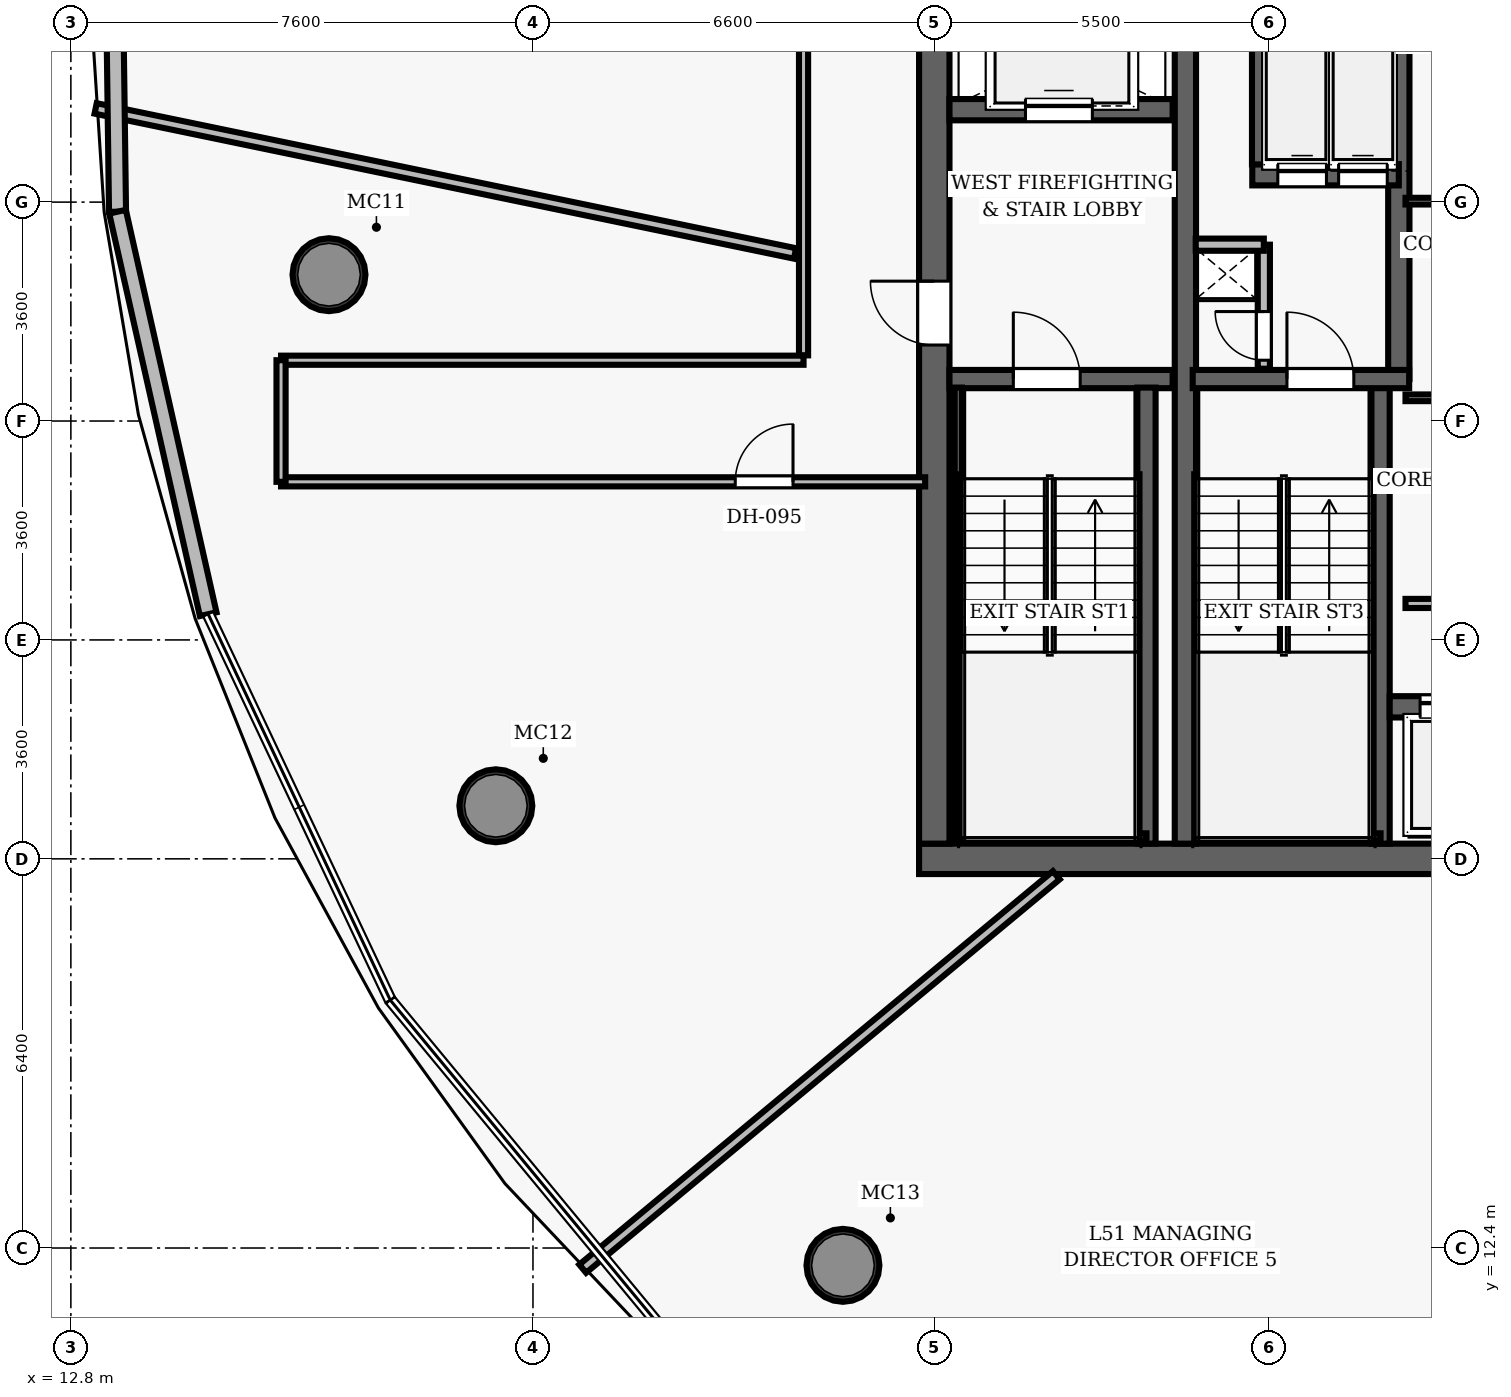
"""IFC4 building model, lengths in metres.
Left out: names, types, materials, properties, quantities, classifications, styles, units other than length and angle.
Written with IfcOpenShell. Run it as: python <this file> out.ifc"""

import sys

from ifc_helpers import new_model, si_unit, direction, frame, frame_2d, origin, origin_2d, place, context, subcontext, project, spatial, rectangle, hollow_circle, extrude, element, fill, save


model = new_model("IFC4")
c1 = context("Model", 3, precision=1e-05, world=origin(), true_north=direction((0.0, 1.0)))
c2 = subcontext(c1, "Body", "Model", "MODEL_VIEW")
j1 = project(units=[si_unit("LENGTHUNIT", "METRE"), si_unit("PLANEANGLEUNIT", "RADIAN")], contexts=[c1])
p1 = place(None, origin())
s1 = spatial("IfcSite", under=j1, at=p1, CompositionType="ELEMENT")
p2 = place(p1, origin())
s2 = spatial("IfcBuilding", under=s1, at=p2, CompositionType="ELEMENT")
p3 = place(p2, frame((0.0, 0.0, 202.0)))
s3 = spatial("IfcBuildingStorey", under=s2, at=p3, CompositionType="ELEMENT", Elevation=202.0)
p4 = place(p3, frame((26.75, 18.8, 0.0), z_axis=(0.0, 0.0, 1.0), x_axis=(1.0, 0.0, 0.0)))
e1 = element("IfcWall", 1, at=p4, inside=s3, PredefinedType="SHEAR", context=c2, shape_type="SweptSolid", body=[
    extrude(rectangle(XDim=22.5, YDim=0.5, at=frame_2d((11.25, 0.0))), origin(), (0.0, 0.0, 1.0), 3.85),
])
p5 = place(p4, frame((14.47, 0.0, 0.0)))
e2 = element("IfcOpeningElement", 2, at=p5, cuts=e1, PredefinedType="OPENING", context=c2, shape_type="SweptSolid", body=[
    extrude(rectangle(XDim=1.05, YDim=2.15, at=frame_2d((0.525, 1.075))), frame((0.0, 0.26, 0.0), z_axis=(0.0, -1.0, 0.0), x_axis=(1.0, 0.0, 0.0)), (0.0, 0.0, 1.0), 0.52),
])
p6 = place(p3, frame((27.0, 19.05, 0.0), z_axis=(0.0, 0.0, 1.0), x_axis=(0.0, 1.0, 0.0)))
e3 = element("IfcWall", 3, at=p6, inside=s3, PredefinedType="SHEAR", context=c2, shape_type="SweptSolid", body=[
    extrude(rectangle(XDim=13.9, YDim=0.5, at=frame_2d((6.95, 0.0))), origin(), (0.0, 0.0, 1.0), 3.85),
])
p7 = place(p6, frame((8.2, 0.0, 0.0)))
e4 = element("IfcOpeningElement", 4, at=p7, cuts=e3, PredefinedType="OPENING", context=c2, shape_type="SweptSolid", body=[
    extrude(rectangle(XDim=1.05, YDim=2.15, at=frame_2d((0.525, 1.075))), frame((0.0, 0.26, 0.0), z_axis=(0.0, -1.0, 0.0), x_axis=(1.0, 0.0, 0.0)), (0.0, 0.0, 1.0), 0.52),
])
p8 = place(p3, frame((31.13, 19.05, 0.0), z_axis=(0.0, 0.0, 1.0), x_axis=(0.0, 1.0, 0.0)))
e5 = element("IfcWall", 5, at=p8, inside=s3, PredefinedType="SHEAR", context=c2, shape_type="SweptSolid", body=[
    extrude(rectangle(XDim=13.9, YDim=0.35, at=frame_2d((6.95, 0.0))), origin(), (0.0, 0.0, 1.0), 3.85),
])
for number, where, z_axis, x_axis in (
    (6, (17.045, 28.406, 0.0), (0.0, 0.0, 1.0), (1.0, 0.0, 0.0)),
    (7, (19.79, 19.673, 0.0), (0.0, 0.0, 1.0), (1.0, 0.0, 0.0)),
    (8, (25.498, 12.115, 0.0), (0.0, 0.0, 1.0), (1.0, 0.0, 0.0)),
):
    element("IfcColumn", number, at=place(p3, frame(where, z_axis=z_axis, x_axis=x_axis)), inside=s3, PredefinedType="COLUMN", context=c2, shape_type="SweptSolid", body=[
        extrude(hollow_circle(Radius=0.6, WallThickness=0.05, at=origin_2d()), origin(), (0.0, 0.0, 1.0), 3.85),
    ])
p9 = place(p3, frame((27.25, 26.69, 0.0), z_axis=(0.0, 0.0, 1.0), x_axis=(1.0, 0.0, 0.0)))
e9 = element("IfcWall", 9, at=p9, inside=s3, PredefinedType="SHEAR", context=c2, shape_type="SweptSolid", body=[
    extrude(rectangle(XDim=3.67, YDim=0.3, at=frame_2d((1.835, 0.0))), origin(), (0.0, 0.0, 1.0), 3.85),
])
p10 = place(p9, frame((1.05, 0.0, 0.0)))
e10 = element("IfcOpeningElement", 10, at=p10, cuts=e9, PredefinedType="OPENING", context=c2, shape_type="SweptSolid", body=[
    extrude(rectangle(XDim=1.1, YDim=2.15, at=frame_2d((0.55, 1.075))), frame((0.0, 0.16, 0.0), z_axis=(0.0, -1.0, 0.0), x_axis=(1.0, 0.0, 0.0)), (0.0, 0.0, 1.0), 0.32),
])
p11 = place(p3, frame((30.49, 19.05, 0.0), z_axis=(0.0, 0.0, 1.0), x_axis=(0.0, 1.0, 0.0)))
e11 = element("IfcWall", 11, at=p11, inside=s3, PredefinedType="SHEAR", context=c2, shape_type="SweptSolid", body=[
    extrude(rectangle(XDim=7.5, YDim=0.3, at=frame_2d((3.75, 0.0))), origin(), (0.0, 0.0, 1.0), 3.85),
])
p12 = place(p3, frame((27.395, 19.1, 0.0), z_axis=(0.0, 0.0, 1.0), x_axis=(0.0, 1.0, 0.0)))
e12 = element("IfcWall", 12, at=p12, inside=s3, PredefinedType="SHEAR", context=c2, shape_type="SweptSolid", body=[
    extrude(rectangle(XDim=7.45, YDim=0.12, at=frame_2d((3.725, 0.0))), origin(), (0.0, 0.0, 1.0), 3.85),
])
p13 = place(p3, frame((27.395, 19.16, 0.0), z_axis=(0.0, 0.0, 1.0), x_axis=(1.0, 0.0, 0.0)))
e13 = element("IfcWall", 13, at=p13, inside=s3, PredefinedType="SHEAR", context=c2, shape_type="SweptSolid", body=[
    extrude(rectangle(XDim=3.095, YDim=0.12, at=frame_2d((1.547, 0.0))), origin(), (0.0, 0.0, 1.0), 3.85),
])
p14 = place(p3, frame((27.25, 31.12, 0.0), z_axis=(0.0, 0.0, 1.0), x_axis=(1.0, 0.0, 0.0)))
e14 = element("IfcWall", 14, at=p14, inside=s3, PredefinedType="SHEAR", context=c2, shape_type="SweptSolid", body=[
    extrude(rectangle(XDim=3.67, YDim=0.35, at=frame_2d((1.835, 0.0))), origin(), (0.0, 0.0, 1.0), 3.035),
])
p15 = place(p14, frame((1.25, 0.0, 0.0)))
e15 = element("IfcOpeningElement", 15, at=p15, cuts=e14, PredefinedType="OPENING", context=c2, shape_type="SweptSolid", body=[
    extrude(rectangle(XDim=1.1, YDim=2.15, at=frame_2d((0.55, 1.075))), frame((0.0, 0.185, 0.0), z_axis=(0.0, -1.0, 0.0), x_axis=(1.0, 0.0, 0.0)), (0.0, 0.0, 1.0), 0.37),
])
p16 = place(p3, frame((34.34, 19.05, 0.0), z_axis=(0.0, 0.0, 1.0), x_axis=(0.0, 1.0, 0.0)))
e16 = element("IfcWall", 16, at=p16, inside=s3, PredefinedType="SHEAR", context=c2, shape_type="SweptSolid", body=[
    extrude(rectangle(XDim=7.5, YDim=0.3, at=frame_2d((3.75, 0.0))), origin(), (0.0, 0.0, 1.0), 3.85),
])
p17 = place(p3, frame((34.64, 26.69, 0.0), z_axis=(0.0, 0.0, 1.0), x_axis=(0.0, 1.0, 0.0)))
e17 = element("IfcWall", 17, at=p17, inside=s3, PredefinedType="SHEAR", context=c2, shape_type="SweptSolid", body=[
    extrude(rectangle(XDim=6.26, YDim=0.35, at=frame_2d((3.13, 0.0))), origin(), (0.0, 0.0, 1.0), 3.85),
])
p18 = place(p3, frame((31.25, 26.69, 0.0), z_axis=(0.0, 0.0, 1.0), x_axis=(1.0, 0.0, 0.0)))
e18 = element("IfcWall", 18, at=p18, inside=s3, PredefinedType="SHEAR", context=c2, shape_type="SweptSolid", body=[
    extrude(rectangle(XDim=3.56, YDim=0.3, at=frame_2d((1.78, 0.0))), origin(), (0.0, 0.0, 1.0), 3.85),
])
p19 = place(p18, frame((1.55, 0.0, 0.0)))
e19 = element("IfcOpeningElement", 19, at=p19, cuts=e18, PredefinedType="OPENING", context=c2, shape_type="SweptSolid", body=[
    extrude(rectangle(XDim=1.1, YDim=2.15, at=frame_2d((0.55, 1.075))), frame((0.0, 0.16, 0.0), z_axis=(0.0, -1.0, 0.0), x_axis=(1.0, 0.0, 0.0)), (0.0, 0.0, 1.0), 0.32),
])
p20 = place(p3, frame((31.3, 19.16, 0.0), z_axis=(0.0, 0.0, 1.0), x_axis=(1.0, 0.0, 0.0)))
e20 = element("IfcWall", 20, at=p20, inside=s3, PredefinedType="SHEAR", context=c2, shape_type="SweptSolid", body=[
    extrude(rectangle(XDim=3.04, YDim=0.12, at=frame_2d((1.52, 0.0))), origin(), (0.0, 0.0, 1.0), 3.85),
])
p21 = place(p3, frame((32.23, 30.05, 0.0), z_axis=(0.0, 0.0, 1.0), x_axis=(1.0, 0.0, 0.0)))
e21 = element("IfcWall", 21, at=p21, inside=s3, PredefinedType="SHEAR", context=c2, shape_type="SweptSolid", body=[
    extrude(rectangle(XDim=2.41, YDim=0.35, at=frame_2d((1.205, 0.0))), origin(), (0.0, 0.0, 1.0), 3.035),
])
p22 = place(p21, frame((0.42, 0.0, 0.0)))
e22 = element("IfcOpeningElement", 22, at=p22, cuts=e21, PredefinedType="OPENING", context=c2, shape_type="SweptSolid", body=[
    extrude(rectangle(XDim=0.8, YDim=2.15, at=frame_2d((0.4, 1.075))), frame((0.0, 0.185, 0.0), z_axis=(0.0, -1.0, 0.0), x_axis=(1.0, 0.0, 0.0)), (0.0, 0.0, 1.0), 0.37),
])
p23 = place(p21, frame((1.42, 0.0, 0.0)))
e23 = element("IfcOpeningElement", 23, at=p23, cuts=e21, PredefinedType="OPENING", context=c2, shape_type="SweptSolid", body=[
    extrude(rectangle(XDim=0.8, YDim=2.15, at=frame_2d((0.4, 1.075))), frame((0.0, 0.185, 0.0), z_axis=(0.0, -1.0, 0.0), x_axis=(1.0, 0.0, 0.0)), (0.0, 0.0, 1.0), 0.37),
])
p24 = place(p3, frame((32.4, 30.22, 0.0), z_axis=(0.0, 0.0, 1.0), x_axis=(0.0, 1.0, 0.0)))
e24 = element("IfcWall", 24, at=p24, inside=s3, PredefinedType="SHEAR", context=c2, shape_type="SweptSolid", body=[
    extrude(rectangle(XDim=2.73, YDim=0.35, at=frame_2d((1.365, 0.0))), origin(), (0.0, 0.0, 1.0), 3.035),
])
p25 = place(p3, frame((32.42, 26.86, 0.0), z_axis=(0.0, 0.0, 1.0), x_axis=(0.0, 1.0, 0.0)))
e25 = element("IfcWall", 25, at=p25, inside=s3, PredefinedType="PARTITIONING", context=c2, shape_type="SweptSolid", body=[
    extrude(rectangle(XDim=2.04, YDim=0.2, at=frame_2d((1.02, 0.0))), origin(), (0.0, 0.0, 1.0), 3.035),
])
p26 = place(p25, frame((0.14, 0.0, 0.0)))
e26 = element("IfcOpeningElement", 26, at=p26, cuts=e25, PredefinedType="OPENING", context=c2, shape_type="SweptSolid", body=[
    extrude(rectangle(XDim=0.8, YDim=2.05, at=frame_2d((0.4, 1.025))), frame((0.0, 0.11, 0.0), z_axis=(0.0, -1.0, 0.0), x_axis=(1.0, 0.0, 0.0)), (0.0, 0.0, 1.0), 0.22),
])
p27 = place(p3, frame((31.3, 28.9, 0.0), z_axis=(0.0, 0.0, 1.0), x_axis=(1.0, 0.0, 0.0)))
e27 = element("IfcWall", 27, at=p27, inside=s3, PredefinedType="PARTITIONING", context=c2, shape_type="SweptSolid", body=[
    extrude(rectangle(XDim=1.12, YDim=0.2, at=frame_2d((0.56, 0.0))), origin(), (0.0, 0.0, 1.0), 3.035),
])
p28 = place(p3, frame((34.49, 21.3, 0.0), z_axis=(0.0, 0.0, 1.0), x_axis=(1.0, 0.0, 0.0)))
e28 = element("IfcWall", 28, at=p28, inside=s3, PredefinedType="SHEAR", context=c2, shape_type="SweptSolid", body=[
    extrude(rectangle(XDim=6.68, YDim=0.35, at=frame_2d((3.34, 0.0))), origin(), (0.0, 0.0, 1.0), 3.035),
])
p29 = place(p28, frame((0.5, 0.0, 0.0)))
e29 = element("IfcOpeningElement", 29, at=p29, cuts=e28, PredefinedType="OPENING", context=c2, shape_type="SweptSolid", body=[
    extrude(rectangle(XDim=0.9, YDim=2.15, at=frame_2d((0.45, 1.075))), frame((0.0, 0.185, 0.0), z_axis=(0.0, -1.0, 0.0), x_axis=(1.0, 0.0, 0.0)), (0.0, 0.0, 1.0), 0.37),
])
p30 = place(p28, frame((2.58, 0.0, 0.0)))
e30 = element("IfcOpeningElement", 30, at=p30, cuts=e28, PredefinedType="OPENING", context=c2, shape_type="SweptSolid", body=[
    extrude(rectangle(XDim=0.9, YDim=2.15, at=frame_2d((0.45, 1.075))), frame((0.0, 0.185, 0.0), z_axis=(0.0, -1.0, 0.0), x_axis=(1.0, 0.0, 0.0)), (0.0, 0.0, 1.0), 0.37),
])
p31 = place(p28, frame((4.66, 0.0, 0.0)))
e31 = element("IfcOpeningElement", 31, at=p31, cuts=e28, PredefinedType="OPENING", context=c2, shape_type="SweptSolid", body=[
    extrude(rectangle(XDim=0.9, YDim=2.15, at=frame_2d((0.45, 1.075))), frame((0.0, 0.185, 0.0), z_axis=(0.0, -1.0, 0.0), x_axis=(1.0, 0.0, 0.0)), (0.0, 0.0, 1.0), 0.37),
])
p32 = place(p3, frame((34.75, 23.0, 0.0), z_axis=(0.0, 0.0, 1.0), x_axis=(1.0, 0.0, 0.0)))
e32 = element("IfcWall", 32, at=p32, inside=s3, PredefinedType="PARTITIONING", context=c2, shape_type="SweptSolid", body=[
    extrude(rectangle(XDim=6.25, YDim=0.15, at=frame_2d((3.125, 0.0))), origin(), (0.0, 0.0, 1.0), 3.035),
])
for number, where, z_axis, x_axis in (
    (33, (34.75, 26.382, 0.0), (0.0, 0.0, 1.0), (1.0, 0.0, 0.0)),
    (34, (34.75, 29.616, 0.0), (0.0, 0.0, 1.0), (1.0, 0.0, 0.0)),
):
    element("IfcWall", number, at=place(p3, frame(where, z_axis=z_axis, x_axis=x_axis)), inside=s3, PredefinedType="PARTITIONING", context=c2, shape_type="SweptSolid", body=[
        extrude(rectangle(XDim=6.25, YDim=0.11, at=frame_2d((3.125, 0.0))), origin(), (0.0, 0.0, 1.0), 3.035),
    ])
p33 = place(p3, frame((24.85, 27.08, 0.0), z_axis=(0.0, 0.0, 1.0), x_axis=(0.0, 1.0, 0.0)))
e35 = element("IfcWall", 35, at=p33, inside=s3, PredefinedType="PARTITIONING", context=c2, shape_type="SweptSolid", body=[
    extrude(rectangle(XDim=8.12, YDim=0.15, at=frame_2d((4.06, 0.0))), origin(), (0.0, 0.0, 1.0), 3.035),
])
p34 = place(p3, frame((16.257, 27.0, 0.0), z_axis=(0.0, 0.0, 1.0), x_axis=(1.0, 0.0, 0.0)))
e36 = element("IfcWall", 36, at=p34, inside=s3, PredefinedType="PARTITIONING", context=c2, shape_type="SweptSolid", body=[
    extrude(rectangle(XDim=8.593, YDim=0.15, at=frame_2d((4.297, 0.0))), origin(), (0.0, 0.0, 1.0), 3.035),
])
p35 = place(p3, frame((16.257, 25.0, 0.0), z_axis=(0.0, 0.0, 1.0), x_axis=(1.0, 0.0, 0.0)))
e37 = element("IfcWall", 37, at=p35, inside=s3, PredefinedType="PARTITIONING", context=c2, shape_type="SweptSolid", body=[
    extrude(rectangle(XDim=10.593, YDim=0.15, at=frame_2d((5.297, 0.0))), origin(), (0.0, 0.0, 1.0), 3.035),
])
p36 = place(p35, frame((7.47, 0.0, 0.0)))
e38 = element("IfcOpeningElement", 38, at=p36, cuts=e37, PredefinedType="OPENING", context=c2, shape_type="SweptSolid", body=[
    extrude(rectangle(XDim=0.95, YDim=2.15, at=frame_2d((0.475, 1.075))), frame((0.0, 0.085, 0.0), z_axis=(0.0, -1.0, 0.0), x_axis=(1.0, 0.0, 0.0)), (0.0, 0.0, 1.0), 0.17),
])
p37 = place(p3, frame((16.257, 25.0, 0.0), z_axis=(0.0, 0.0, 1.0), x_axis=(0.0, 1.0, 0.0)))
e39 = element("IfcWall", 39, at=p37, inside=s3, PredefinedType="PARTITIONING", context=c2, shape_type="SweptSolid", body=[
    extrude(rectangle(XDim=2.0, YDim=0.15, at=frame_2d((1.0, 0.0))), origin(), (0.0, 0.0, 1.0), 3.035),
])
p38 = place(p3, frame((24.71, 28.756, 0.0), z_axis=(0.0, 0.0, 1.0), x_axis=(-0.979172598115, 0.203029611389, 0.0)))
e40 = element("IfcWall", 40, at=p38, inside=s3, PredefinedType="PARTITIONING", context=c2, shape_type="SweptSolid", body=[
    extrude(rectangle(XDim=11.747, YDim=0.175, at=frame_2d((5.874, 0.0))), origin(), (0.0, 0.0, 1.0), 3.035),
])
p39 = place(p3, frame((29.007, 18.53, 0.0), z_axis=(0.0, 0.0, 1.0), x_axis=(-0.76922629078, -0.638976457761, 0.0)))
e41 = element("IfcWall", 41, at=p39, inside=s3, PredefinedType="PARTITIONING", context=c2, shape_type="SweptSolid", body=[
    extrude(rectangle(XDim=10.125, YDim=0.175, at=frame_2d((5.063, 0.0))), origin(), (0.0, 0.0, 1.0), 3.035),
])
p40 = place(p3, frame((13.567, 29.442, 0.0), z_axis=(0.0, 0.0, 1.0), x_axis=(-0.013449236396, 0.99990955493, 0.0)))
e42 = element("IfcWall", 42, at=p40, inside=s3, PredefinedType="SOLIDWALL", context=c2, shape_type="SweptSolid", body=[
    extrude(rectangle(XDim=6.226, YDim=0.28, at=frame_2d((3.113, 0.0))), origin(), (0.0, 0.0, 1.0), 3.62),
])
p41 = place(p3, frame((15.059, 22.823, 0.0), z_axis=(0.0, 0.0, 1.0), x_axis=(-0.219802471022, 0.975544398648, 0.0)))
e43 = element("IfcWall", 43, at=p41, inside=s3, PredefinedType="SOLIDWALL", context=c2, shape_type="SweptSolid", body=[
    extrude(rectangle(XDim=6.784, YDim=0.28, at=frame_2d((3.392, 0.0))), origin(), (0.0, 0.0, 1.0), 3.62),
])
p42 = place(p10, origin())
e44 = element("IfcDoor", 44, at=p42, inside=s3, OperationType="SINGLE_SWING_LEFT", PredefinedType="DOOR", context=c2, shape_type="SweptSolid", body=[
    extrude(rectangle(XDim=1.1, YDim=2.15, at=frame_2d((0.55, 1.075))), frame((0.0, 0.025, 0.0), z_axis=(0.0, -1.0, 0.0), x_axis=(1.0, 0.0, 0.0)), (0.0, 0.0, 1.0), 0.05),
])
fill(e10, e44)
p43 = place(p7, origin())
e45 = element("IfcDoor", 45, at=p43, inside=s3, OperationType="SINGLE_SWING_RIGHT", PredefinedType="DOOR", context=c2, shape_type="SweptSolid", body=[
    extrude(rectangle(XDim=1.05, YDim=2.15, at=frame_2d((0.525, 1.075))), frame((0.0, 0.025, 0.0), z_axis=(0.0, -1.0, 0.0), x_axis=(1.0, 0.0, 0.0)), (0.0, 0.0, 1.0), 0.05),
])
fill(e4, e45)
p44 = place(p19, origin())
e46 = element("IfcDoor", 46, at=p44, inside=s3, OperationType="SINGLE_SWING_LEFT", PredefinedType="DOOR", context=c2, shape_type="SweptSolid", body=[
    extrude(rectangle(XDim=1.1, YDim=2.15, at=frame_2d((0.55, 1.075))), frame((0.0, 0.025, 0.0), z_axis=(0.0, -1.0, 0.0), x_axis=(1.0, 0.0, 0.0)), (0.0, 0.0, 1.0), 0.05),
])
fill(e19, e46)
p45 = place(p26, origin())
e47 = element("IfcDoor", 47, at=p45, inside=s3, OperationType="SINGLE_SWING_RIGHT", PredefinedType="DOOR", context=c2, shape_type="SweptSolid", body=[
    extrude(rectangle(XDim=0.8, YDim=2.05, at=frame_2d((0.4, 1.025))), frame((0.0, 0.025, 0.0), z_axis=(0.0, -1.0, 0.0), x_axis=(1.0, 0.0, 0.0)), (0.0, 0.0, 1.0), 0.05),
])
fill(e26, e47)
p46 = place(p36, origin())
e48 = element("IfcDoor", 48, at=p46, inside=s3, OperationType="SINGLE_SWING_RIGHT", PredefinedType="DOOR", context=c2, shape_type="SweptSolid", body=[
    extrude(rectangle(XDim=0.95, YDim=2.15, at=frame_2d((0.475, 1.075))), frame((0.0, 0.025, 0.0), z_axis=(0.0, -1.0, 0.0), x_axis=(1.0, 0.0, 0.0)), (0.0, 0.0, 1.0), 0.05),
])
fill(e38, e48)
p47 = place(p29, origin())
e49 = element("IfcDoor", 49, at=p47, inside=s3, OperationType="SLIDING_TO_LEFT", PredefinedType="DOOR", context=c2, shape_type="SweptSolid", body=[
    extrude(rectangle(XDim=0.9, YDim=2.15, at=frame_2d((0.45, 1.075))), frame((0.0, 0.025, 0.0), z_axis=(0.0, -1.0, 0.0), x_axis=(1.0, 0.0, 0.0)), (0.0, 0.0, 1.0), 0.05),
])
fill(e29, e49)
p48 = place(p15, origin())
e50 = element("IfcDoor", 50, at=p48, inside=s3, OperationType="SLIDING_TO_LEFT", PredefinedType="DOOR", context=c2, shape_type="SweptSolid", body=[
    extrude(rectangle(XDim=1.1, YDim=2.15, at=frame_2d((0.55, 1.075))), frame((0.0, 0.025, 0.0), z_axis=(0.0, -1.0, 0.0), x_axis=(1.0, 0.0, 0.0)), (0.0, 0.0, 1.0), 0.05),
])
fill(e15, e50)
p49 = place(p22, origin())
e51 = element("IfcDoor", 51, at=p49, inside=s3, OperationType="SLIDING_TO_LEFT", PredefinedType="DOOR", context=c2, shape_type="SweptSolid", body=[
    extrude(rectangle(XDim=0.8, YDim=2.15, at=frame_2d((0.4, 1.075))), frame((0.0, 0.025, 0.0), z_axis=(0.0, -1.0, 0.0), x_axis=(1.0, 0.0, 0.0)), (0.0, 0.0, 1.0), 0.05),
])
fill(e22, e51)
p50 = place(p23, origin())
e52 = element("IfcDoor", 52, at=p50, inside=s3, OperationType="SLIDING_TO_LEFT", PredefinedType="DOOR", context=c2, shape_type="SweptSolid", body=[
    extrude(rectangle(XDim=0.8, YDim=2.15, at=frame_2d((0.4, 1.075))), frame((0.0, 0.025, 0.0), z_axis=(0.0, -1.0, 0.0), x_axis=(1.0, 0.0, 0.0)), (0.0, 0.0, 1.0), 0.05),
])
fill(e23, e52)
save(model, sys.argv[1])
